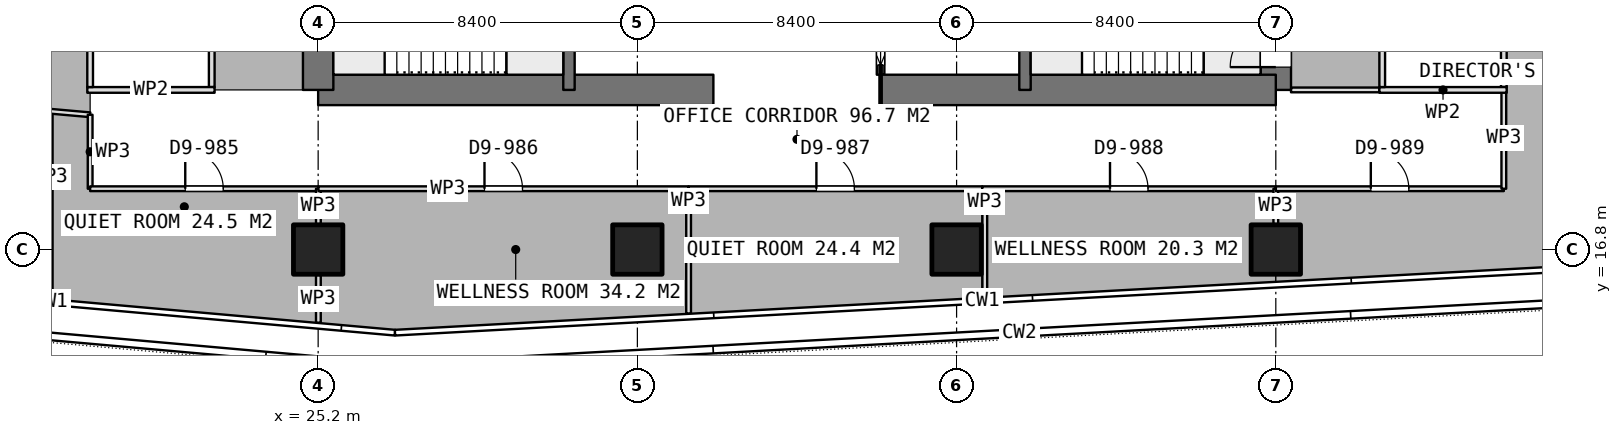
"""IFC4 building model, lengths in metres.
Left out: names, types, materials, properties, quantities, classifications, styles, units other than length and angle.
Written with IfcOpenShell. Run it as: python <this file> out.ifc"""

import sys

from ifc_helpers import new_model, si_unit, direction, frame, frame_2d, origin, origin_2d, place, context, subcontext, project, spatial, rectangle, extrude, element, fill, save


model = new_model("IFC4")
c1 = context("Model", 3, precision=1e-05, world=origin(), true_north=direction((0.0, 1.0)))
c2 = subcontext(c1, "Body", "Model", "MODEL_VIEW")
j1 = project(units=[si_unit("LENGTHUNIT", "METRE"), si_unit("PLANEANGLEUNIT", "RADIAN")], contexts=[c1])
p1 = place(None, origin())
s1 = spatial("IfcSite", under=j1, at=p1, CompositionType="ELEMENT")
p2 = place(p1, origin())
s2 = spatial("IfcBuilding", under=s1, at=p2, CompositionType="ELEMENT")
p3 = place(p2, frame((0.0, 0.0, 265.1)))
s3 = spatial("IfcBuildingStorey", under=s2, at=p3, CompositionType="ELEMENT", Elevation=265.1)
p4 = place(p3, frame((25.2, 21.0, 0.0), z_axis=(0.0, 0.0, 1.0), x_axis=(1.0, 0.0, 0.0)))
e1 = element("IfcWall", 1, at=p4, inside=s3, PredefinedType="SHEAR", context=c2, shape_type="SweptSolid", body=[
    extrude(rectangle(XDim=10.4, YDim=0.8, at=frame_2d((5.2, 0.0))), origin(), (0.0, 0.0, 1.0), 3.75),
])
p5 = place(p3, frame((40.0, 21.0, 0.0), z_axis=(0.0, 0.0, 1.0), x_axis=(1.0, 0.0, 0.0)))
e2 = element("IfcWall", 2, at=p5, inside=s3, PredefinedType="SHEAR", context=c2, shape_type="SweptSolid", body=[
    extrude(rectangle(XDim=10.4, YDim=0.8, at=frame_2d((5.2, 0.0))), origin(), (0.0, 0.0, 1.0), 3.75),
])
p6 = place(p3, frame((25.2, 21.0, 0.0), z_axis=(0.0, 0.0, 1.0), x_axis=(0.0, 1.0, 0.0)))
e3 = element("IfcWall", 3, at=p6, inside=s3, PredefinedType="SHEAR", context=c2, shape_type="SweptSolid", body=[
    extrude(rectangle(XDim=25.2, YDim=0.8, at=frame_2d((12.6, 0.0))), origin(), (0.0, 0.0, 1.0), 3.75),
])
p7 = place(p6, frame((7.8, 0.0, 0.0)))
e4 = element("IfcOpeningElement", 4, at=p7, cuts=e3, PredefinedType="OPENING", context=c2, shape_type="SweptSolid", body=[
    extrude(rectangle(XDim=1.2, YDim=2.1, at=frame_2d((0.6, 1.05))), frame((0.0, 0.41, 0.0), z_axis=(0.0, -1.0, 0.0), x_axis=(1.0, 0.0, 0.0)), (0.0, 0.0, 1.0), 0.82),
])
p8 = place(p6, frame((14.25, 0.0, 0.0)))
e5 = element("IfcOpeningElement", 5, at=p8, cuts=e3, PredefinedType="OPENING", context=c2, shape_type="SweptSolid", body=[
    extrude(rectangle(XDim=0.9, YDim=2.1, at=frame_2d((0.45, 1.05))), frame((0.0, 0.41, 0.0), z_axis=(0.0, -1.0, 0.0), x_axis=(1.0, 0.0, 0.0)), (0.0, 0.0, 1.0), 0.82),
])
p9 = place(p6, frame((16.85, 0.0, 0.0)))
e6 = element("IfcOpeningElement", 6, at=p9, cuts=e3, PredefinedType="OPENING", context=c2, shape_type="SweptSolid", body=[
    extrude(rectangle(XDim=0.9, YDim=2.1, at=frame_2d((0.45, 1.05))), frame((0.0, 0.41, 0.0), z_axis=(0.0, -1.0, 0.0), x_axis=(1.0, 0.0, 0.0)), (0.0, 0.0, 1.0), 0.82),
])
p10 = place(p6, frame((18.95, 0.0, 0.0)))
e7 = element("IfcOpeningElement", 7, at=p10, cuts=e3, PredefinedType="OPENING", context=c2, shape_type="SweptSolid", body=[
    extrude(rectangle(XDim=1.2, YDim=2.1, at=frame_2d((0.6, 1.05))), frame((0.0, 0.41, 0.0), z_axis=(0.0, -1.0, 0.0), x_axis=(1.0, 0.0, 0.0)), (0.0, 0.0, 1.0), 0.82),
])
p11 = place(p3, frame((50.4, 21.0, 0.0), z_axis=(0.0, 0.0, 1.0), x_axis=(0.0, 1.0, 0.0)))
e8 = element("IfcWall", 8, at=p11, inside=s3, PredefinedType="SHEAR", context=c2, shape_type="SweptSolid", body=[
    extrude(rectangle(XDim=25.2, YDim=0.8, at=frame_2d((12.6, 0.0))), origin(), (0.0, 0.0, 1.0), 3.75),
])
p12 = place(p11, frame((16.2, 0.0, 0.0)))
e9 = element("IfcOpeningElement", 9, at=p12, cuts=e8, PredefinedType="OPENING", context=c2, shape_type="SweptSolid", body=[
    extrude(rectangle(XDim=1.2, YDim=2.1, at=frame_2d((0.6, 1.05))), frame((0.0, 0.41, 0.0), z_axis=(0.0, -1.0, 0.0), x_axis=(1.0, 0.0, 0.0)), (0.0, 0.0, 1.0), 0.82),
])
p13 = place(p11, frame((10.05, 0.0, 0.0)))
e10 = element("IfcOpeningElement", 10, at=p13, cuts=e8, PredefinedType="OPENING", context=c2, shape_type="SweptSolid", body=[
    extrude(rectangle(XDim=0.9, YDim=2.1, at=frame_2d((0.45, 1.05))), frame((0.0, 0.41, 0.0), z_axis=(0.0, -1.0, 0.0), x_axis=(1.0, 0.0, 0.0)), (0.0, 0.0, 1.0), 0.82),
])
p14 = place(p11, frame((7.45, 0.0, 0.0)))
e11 = element("IfcOpeningElement", 11, at=p14, cuts=e8, PredefinedType="OPENING", context=c2, shape_type="SweptSolid", body=[
    extrude(rectangle(XDim=0.9, YDim=2.1, at=frame_2d((0.45, 1.05))), frame((0.0, 0.41, 0.0), z_axis=(0.0, -1.0, 0.0), x_axis=(1.0, 0.0, 0.0)), (0.0, 0.0, 1.0), 0.82),
])
p15 = place(p11, frame((0.6, 0.0, 0.0)))
e12 = element("IfcOpeningElement", 12, at=p15, cuts=e8, PredefinedType="OPENING", context=c2, shape_type="SweptSolid", body=[
    extrude(rectangle(XDim=1.2, YDim=2.1, at=frame_2d((0.6, 1.05))), frame((0.0, 0.41, 0.0), z_axis=(0.0, -1.0, 0.0), x_axis=(1.0, 0.0, 0.0)), (0.0, 0.0, 1.0), 0.82),
])
for number, where, z_axis, x_axis in (
    (13, (31.8, 21.0, 0.0), (0.0, 0.0, 1.0), (0.0, 1.0, 0.0)),
    (14, (43.8, 21.0, 0.0), (0.0, 0.0, 1.0), (0.0, 1.0, 0.0)),
):
    element("IfcWall", number, at=place(p3, frame(where, z_axis=z_axis, x_axis=x_axis)), inside=s3, PredefinedType="SHEAR", context=c2, shape_type="SweptSolid", body=[
        extrude(rectangle(XDim=25.2, YDim=0.3, at=frame_2d((12.6, 0.0))), origin(), (0.0, 0.0, 1.0), 3.75),
    ])
for number, where, z_axis, x_axis in (
    (15, (25.2, 16.8, 0.0), (0.0, 0.0, 1.0), (1.0, 0.0, 0.0)),
    (16, (33.6, 16.8, 0.0), (0.0, 0.0, 1.0), (1.0, 0.0, 0.0)),
    (17, (42.0, 16.8, 0.0), (0.0, 0.0, 1.0), (1.0, 0.0, 0.0)),
    (18, (50.4, 16.8, 0.0), (0.0, 0.0, 1.0), (1.0, 0.0, 0.0)),
):
    element("IfcColumn", number, at=place(p3, frame(where, z_axis=z_axis, x_axis=x_axis)), inside=s3, PredefinedType="COLUMN", context=c2, shape_type="SweptSolid", body=[
        extrude(rectangle(XDim=1.3, YDim=1.3, at=origin_2d()), origin(), (0.0, 0.0, 1.0), 3.75),
    ])
p16 = place(p3, frame((40.0, 21.4, 0.0), z_axis=(0.0, 0.0, 1.0), x_axis=(0.0, 1.0, 0.0)))
e19 = element("IfcWall", 19, at=p16, inside=s3, PredefinedType="PARTITIONING", context=c2, shape_type="SweptSolid", body=[
    extrude(rectangle(XDim=1.85, YDim=0.2, at=frame_2d((0.925, 0.0))), origin(), (0.0, 0.0, 1.0), 3.5),
])
p17 = place(p16, frame((0.25, 0.0, 0.0)))
e20 = element("IfcOpeningElement", 20, at=p17, cuts=e19, PredefinedType="OPENING", context=c2, shape_type="SweptSolid", body=[
    extrude(rectangle(XDim=1.1, YDim=2.1, at=frame_2d((0.55, 1.05))), frame((0.0, 0.11, 0.0), z_axis=(0.0, -1.0, 0.0), x_axis=(1.0, 0.0, 0.0)), (0.0, 0.0, 1.0), 0.22),
])
p18 = place(p3, frame((19.125, 21.0, 0.0), z_axis=(0.0, 0.0, 1.0), x_axis=(1.0, 0.0, 0.0)))
e21 = element("IfcWall", 21, at=p18, inside=s3, PredefinedType="PARTITIONING", context=c2, shape_type="SweptSolid", body=[
    extrude(rectangle(XDim=3.35, YDim=0.15, at=frame_2d((1.675, 0.0))), origin(), (0.0, 0.0, 1.0), 3.5),
])
p19 = place(p3, frame((19.2, 21.075, 0.0), z_axis=(0.0, 0.0, 1.0), x_axis=(0.0, 1.0, 0.0)))
e22 = element("IfcWall", 22, at=p19, inside=s3, PredefinedType="PARTITIONING", context=c2, shape_type="SweptSolid", body=[
    extrude(rectangle(XDim=6.85, YDim=0.15, at=frame_2d((3.425, 0.0))), origin(), (0.0, 0.0, 1.0), 3.5),
])
p20 = place(p3, frame((22.4, 21.075, 0.0), z_axis=(0.0, 0.0, 1.0), x_axis=(0.0, 1.0, 0.0)))
e23 = element("IfcWall", 23, at=p20, inside=s3, PredefinedType="PARTITIONING", context=c2, shape_type="SweptSolid", body=[
    extrude(rectangle(XDim=6.85, YDim=0.15, at=frame_2d((3.425, 0.0))), origin(), (0.0, 0.0, 1.0), 3.5),
])
p21 = place(p20, frame((2.925, 0.0, 0.0)))
e24 = element("IfcOpeningElement", 24, at=p21, cuts=e23, PredefinedType="OPENING", context=c2, shape_type="SweptSolid", body=[
    extrude(rectangle(XDim=1.0, YDim=2.1, at=frame_2d((0.5, 1.05))), frame((0.0, 0.085, 0.0), z_axis=(0.0, -1.0, 0.0), x_axis=(1.0, 0.0, 0.0)), (0.0, 0.0, 1.0), 0.17),
])
p22 = place(p3, frame((53.125, 21.0, 0.0), z_axis=(0.0, 0.0, 1.0), x_axis=(1.0, 0.0, 0.0)))
e25 = element("IfcWall", 25, at=p22, inside=s3, PredefinedType="PARTITIONING", context=c2, shape_type="SweptSolid", body=[
    extrude(rectangle(XDim=3.35, YDim=0.15, at=frame_2d((1.675, 0.0))), origin(), (0.0, 0.0, 1.0), 3.5),
])
p23 = place(p3, frame((53.2, 21.075, 0.0), z_axis=(0.0, 0.0, 1.0), x_axis=(0.0, 1.0, 0.0)))
e26 = element("IfcWall", 26, at=p23, inside=s3, PredefinedType="PARTITIONING", context=c2, shape_type="SweptSolid", body=[
    extrude(rectangle(XDim=6.85, YDim=0.15, at=frame_2d((3.425, 0.0))), origin(), (0.0, 0.0, 1.0), 3.5),
])
p24 = place(p23, frame((2.925, 0.0, 0.0)))
e27 = element("IfcOpeningElement", 27, at=p24, cuts=e26, PredefinedType="OPENING", context=c2, shape_type="SweptSolid", body=[
    extrude(rectangle(XDim=1.0, YDim=2.1, at=frame_2d((0.5, 1.05))), frame((0.0, 0.085, 0.0), z_axis=(0.0, -1.0, 0.0), x_axis=(1.0, 0.0, 0.0)), (0.0, 0.0, 1.0), 0.17),
])
p25 = place(p3, frame((56.4, 21.075, 0.0), z_axis=(0.0, 0.0, 1.0), x_axis=(0.0, 1.0, 0.0)))
e28 = element("IfcWall", 28, at=p25, inside=s3, PredefinedType="PARTITIONING", context=c2, shape_type="SweptSolid", body=[
    extrude(rectangle(XDim=6.85, YDim=0.15, at=frame_2d((3.425, 0.0))), origin(), (0.0, 0.0, 1.0), 3.5),
])
p26 = place(p3, frame((53.124, 21.0, 0.0), z_axis=(0.0, 0.0, 1.0), x_axis=(-1.0, 0.0, 0.0)))
e29 = element("IfcWall", 29, at=p26, inside=s3, PredefinedType="PARTITIONING", context=c2, shape_type="SweptSolid", body=[
    extrude(rectangle(XDim=2.324, YDim=0.125, at=frame_2d((1.162, 0.0))), origin(), (0.0, 0.0, 1.0), 3.5),
])
p27 = place(p3, frame((34.948, 15.114, 0.0), z_axis=(0.0, 0.0, 1.0), x_axis=(0.0, 1.0, 0.0)))
e30 = element("IfcWall", 30, at=p27, inside=s3, PredefinedType="PARTITIONING", context=c2, shape_type="SweptSolid", body=[
    extrude(rectangle(XDim=3.286, YDim=0.125, at=frame_2d((1.643, 0.0))), origin(), (0.0, 0.0, 1.0), 3.5),
])
p28 = place(p3, frame((34.948, 18.4, 0.0), z_axis=(0.0, 0.0, 1.0), x_axis=(1.0, 0.0, 0.0)))
e31 = element("IfcWall", 31, at=p28, inside=s3, PredefinedType="PARTITIONING", context=c2, shape_type="SweptSolid", body=[
    extrude(rectangle(XDim=7.725, YDim=0.125, at=frame_2d((3.863, 0.0))), origin(), (0.0, 0.0, 1.0), 3.5),
])
p29 = place(p28, frame((3.363, 0.0, 0.0)))
e32 = element("IfcOpeningElement", 32, at=p29, cuts=e31, PredefinedType="OPENING", context=c2, shape_type="SweptSolid", body=[
    extrude(rectangle(XDim=1.0, YDim=2.1, at=frame_2d((0.5, 1.05))), frame((0.0, 0.073, 0.0), z_axis=(0.0, -1.0, 0.0), x_axis=(1.0, 0.0, 0.0)), (0.0, 0.0, 1.0), 0.145),
])
p30 = place(p3, frame((42.742, 18.337, 0.0), z_axis=(0.0, 0.0, 1.0), x_axis=(0.0, -1.0, 0.0)))
e33 = element("IfcWall", 33, at=p30, inside=s3, PredefinedType="PARTITIONING", context=c2, shape_type="SweptSolid", body=[
    extrude(rectangle(XDim=2.799, YDim=0.125, at=frame_2d((1.399, 0.0))), origin(), (0.0, 0.0, 1.0), 3.5),
])
p31 = place(p3, frame((42.674, 18.4, 0.0), z_axis=(0.0, 0.0, 1.0), x_axis=(1.0, 0.0, 0.0)))
e34 = element("IfcWall", 34, at=p31, inside=s3, PredefinedType="PARTITIONING", context=c2, shape_type="SweptSolid", body=[
    extrude(rectangle(XDim=7.726, YDim=0.125, at=frame_2d((3.863, 0.0))), origin(), (0.0, 0.0, 1.0), 3.5),
])
p32 = place(p31, frame((3.363, 0.0, 0.0)))
e35 = element("IfcOpeningElement", 35, at=p32, cuts=e34, PredefinedType="OPENING", context=c2, shape_type="SweptSolid", body=[
    extrude(rectangle(XDim=1.0, YDim=2.1, at=frame_2d((0.5, 1.05))), frame((0.0, 0.073, 0.0), z_axis=(0.0, -1.0, 0.0), x_axis=(1.0, 0.0, 0.0)), (0.0, 0.0, 1.0), 0.145),
])
p33 = place(p3, frame((50.4, 18.4, 0.0), z_axis=(0.0, 0.0, 1.0), x_axis=(0.0, -1.0, 0.0)))
e36 = element("IfcWall", 36, at=p33, inside=s3, PredefinedType="PARTITIONING", context=c2, shape_type="SweptSolid", body=[
    extrude(rectangle(XDim=0.93, YDim=0.125, at=frame_2d((0.465, 0.0))), origin(), (0.0, 0.0, 1.0), 3.5),
])
p34 = place(p3, frame((50.401, 18.4, 0.0), z_axis=(0.0, 0.0, 1.0), x_axis=(1.0, 0.0, 0.0)))
e37 = element("IfcWall", 37, at=p34, inside=s3, PredefinedType="PARTITIONING", context=c2, shape_type="SweptSolid", body=[
    extrude(rectangle(XDim=5.999, YDim=0.125, at=frame_2d((3.0, 0.0))), origin(), (0.0, 0.0, 1.0), 3.5),
])
p35 = place(p34, frame((2.499, 0.0, 0.0)))
e38 = element("IfcOpeningElement", 38, at=p35, cuts=e37, PredefinedType="OPENING", context=c2, shape_type="SweptSolid", body=[
    extrude(rectangle(XDim=1.0, YDim=2.1, at=frame_2d((0.5, 1.05))), frame((0.0, 0.073, 0.0), z_axis=(0.0, -1.0, 0.0), x_axis=(1.0, 0.0, 0.0)), (0.0, 0.0, 1.0), 0.145),
])
p36 = place(p3, frame((56.4, 18.4, 0.0), z_axis=(0.0, 0.0, 1.0), x_axis=(0.0, 1.0, 0.0)))
e39 = element("IfcWall", 39, at=p36, inside=s3, PredefinedType="PARTITIONING", context=c2, shape_type="SweptSolid", body=[
    extrude(rectangle(XDim=2.675, YDim=0.125, at=frame_2d((1.337, 0.0))), origin(), (0.0, 0.0, 1.0), 3.5),
])
p37 = place(p3, frame((18.149, 20.439, 0.0), z_axis=(0.0, 0.0, 1.0), x_axis=(0.0, -1.0, 0.0)))
e40 = element("IfcWall", 40, at=p37, inside=s3, PredefinedType="PARTITIONING", context=c2, shape_type="SweptSolid", body=[
    extrude(rectangle(XDim=4.939, YDim=0.125, at=frame_2d((2.469, 0.0))), origin(), (0.0, 0.0, 1.0), 3.5),
])
p38 = place(p3, frame((18.15, 20.439, 0.0), z_axis=(0.0, 0.0, 1.0), x_axis=(0.996099374617, -0.088238517026, 0.0)))
e41 = element("IfcWall", 41, at=p38, inside=s3, PredefinedType="PARTITIONING", context=c2, shape_type="SweptSolid", body=[
    extrude(rectangle(XDim=1.054, YDim=0.125, at=frame_2d((0.527, 0.0))), origin(), (0.0, 0.0, 1.0), 3.5),
])
p39 = place(p3, frame((19.2, 20.346, 0.0), z_axis=(0.0, 0.0, 1.0), x_axis=(0.0, -1.0, 0.0)))
e42 = element("IfcWall", 42, at=p39, inside=s3, PredefinedType="PARTITIONING", context=c2, shape_type="SweptSolid", body=[
    extrude(rectangle(XDim=1.946, YDim=0.125, at=frame_2d((0.973, 0.0))), origin(), (0.0, 0.0, 1.0), 3.5),
])
p40 = place(p3, frame((19.2, 18.4, 0.0), z_axis=(0.0, 0.0, 1.0), x_axis=(1.0, 0.0, 0.0)))
e43 = element("IfcWall", 43, at=p40, inside=s3, PredefinedType="PARTITIONING", context=c2, shape_type="SweptSolid", body=[
    extrude(rectangle(XDim=6.006, YDim=0.125, at=frame_2d((3.003, 0.0))), origin(), (0.0, 0.0, 1.0), 3.5),
])
p41 = place(p40, frame((2.503, 0.0, 0.0)))
e44 = element("IfcOpeningElement", 44, at=p41, cuts=e43, PredefinedType="OPENING", context=c2, shape_type="SweptSolid", body=[
    extrude(rectangle(XDim=1.0, YDim=2.1, at=frame_2d((0.5, 1.05))), frame((0.0, 0.073, 0.0), z_axis=(0.0, -1.0, 0.0), x_axis=(1.0, 0.0, 0.0)), (0.0, 0.0, 1.0), 0.145),
])
p42 = place(p3, frame((25.206, 18.4, 0.0), z_axis=(0.0, 0.0, 1.0), x_axis=(0.0, -1.0, 0.0)))
e45 = element("IfcWall", 45, at=p42, inside=s3, PredefinedType="PARTITIONING", context=c2, shape_type="SweptSolid", body=[
    extrude(rectangle(XDim=0.93, YDim=0.125, at=frame_2d((0.465, 0.0))), origin(), (0.0, 0.0, 1.0), 3.5),
])
p43 = place(p3, frame((25.206, 16.13, 0.0), z_axis=(0.0, 0.0, 1.0), x_axis=(0.0, -1.0, 0.0)))
e46 = element("IfcWall", 46, at=p43, inside=s3, PredefinedType="PARTITIONING", context=c2, shape_type="SweptSolid", body=[
    extrude(rectangle(XDim=1.258, YDim=0.125, at=frame_2d((0.629, 0.0))), origin(), (0.0, 0.0, 1.0), 3.5),
])
p44 = place(p3, frame((25.207, 18.4, 0.0), z_axis=(0.0, 0.0, 1.0), x_axis=(1.0, 0.0, 0.0)))
e47 = element("IfcWall", 47, at=p44, inside=s3, PredefinedType="PARTITIONING", context=c2, shape_type="SweptSolid", body=[
    extrude(rectangle(XDim=9.74, YDim=0.125, at=frame_2d((4.87, 0.0))), origin(), (0.0, 0.0, 1.0), 3.5),
])
p45 = place(p44, frame((4.37, 0.0, 0.0)))
e48 = element("IfcOpeningElement", 48, at=p45, cuts=e47, PredefinedType="OPENING", context=c2, shape_type="SweptSolid", body=[
    extrude(rectangle(XDim=1.0, YDim=2.1, at=frame_2d((0.5, 1.05))), frame((0.0, 0.073, 0.0), z_axis=(0.0, -1.0, 0.0), x_axis=(1.0, 0.0, 0.0)), (0.0, 0.0, 1.0), 0.145),
])
p46 = place(p17, origin())
e49 = element("IfcDoor", 49, at=p46, inside=s3, OperationType="SLIDING_TO_LEFT", PredefinedType="DOOR", context=c2, shape_type="SweptSolid", body=[
    extrude(rectangle(XDim=1.1, YDim=2.1, at=frame_2d((0.55, 1.05))), frame((0.0, 0.025, 0.0), z_axis=(0.0, -1.0, 0.0), x_axis=(1.0, 0.0, 0.0)), (0.0, 0.0, 1.0), 0.05),
])
fill(e20, e49)
p47 = place(p29, origin())
e50 = element("IfcDoor", 50, at=p47, inside=s3, OperationType="SINGLE_SWING_LEFT", PredefinedType="DOOR", context=c2, shape_type="SweptSolid", body=[
    extrude(rectangle(XDim=1.0, YDim=2.1, at=frame_2d((0.5, 1.05))), frame((0.0, 0.025, 0.0), z_axis=(0.0, -1.0, 0.0), x_axis=(1.0, 0.0, 0.0)), (0.0, 0.0, 1.0), 0.05),
])
fill(e32, e50)
p48 = place(p32, origin())
e51 = element("IfcDoor", 51, at=p48, inside=s3, OperationType="SINGLE_SWING_LEFT", PredefinedType="DOOR", context=c2, shape_type="SweptSolid", body=[
    extrude(rectangle(XDim=1.0, YDim=2.1, at=frame_2d((0.5, 1.05))), frame((0.0, 0.025, 0.0), z_axis=(0.0, -1.0, 0.0), x_axis=(1.0, 0.0, 0.0)), (0.0, 0.0, 1.0), 0.05),
])
fill(e35, e51)
p49 = place(p35, origin())
e52 = element("IfcDoor", 52, at=p49, inside=s3, OperationType="SINGLE_SWING_LEFT", PredefinedType="DOOR", context=c2, shape_type="SweptSolid", body=[
    extrude(rectangle(XDim=1.0, YDim=2.1, at=frame_2d((0.5, 1.05))), frame((0.0, 0.025, 0.0), z_axis=(0.0, -1.0, 0.0), x_axis=(1.0, 0.0, 0.0)), (0.0, 0.0, 1.0), 0.05),
])
fill(e38, e52)
p50 = place(p41, origin())
e53 = element("IfcDoor", 53, at=p50, inside=s3, OperationType="SINGLE_SWING_LEFT", PredefinedType="DOOR", context=c2, shape_type="SweptSolid", body=[
    extrude(rectangle(XDim=1.0, YDim=2.1, at=frame_2d((0.5, 1.05))), frame((0.0, 0.025, 0.0), z_axis=(0.0, -1.0, 0.0), x_axis=(1.0, 0.0, 0.0)), (0.0, 0.0, 1.0), 0.05),
])
fill(e44, e53)
p51 = place(p45, origin())
e54 = element("IfcDoor", 54, at=p51, inside=s3, OperationType="SINGLE_SWING_LEFT", PredefinedType="DOOR", context=c2, shape_type="SweptSolid", body=[
    extrude(rectangle(XDim=1.0, YDim=2.1, at=frame_2d((0.5, 1.05))), frame((0.0, 0.025, 0.0), z_axis=(0.0, -1.0, 0.0), x_axis=(1.0, 0.0, 0.0)), (0.0, 0.0, 1.0), 0.05),
])
fill(e48, e54)
p52 = place(p15, origin())
e55 = element("IfcDoor", 55, at=p52, inside=s3, OperationType="SINGLE_SWING_RIGHT", PredefinedType="DOOR", context=c2, shape_type="SweptSolid", body=[
    extrude(rectangle(XDim=1.2, YDim=2.1, at=frame_2d((0.6, 1.05))), frame((0.0, 0.025, 0.0), z_axis=(0.0, -1.0, 0.0), x_axis=(1.0, 0.0, 0.0)), (0.0, 0.0, 1.0), 0.05),
])
fill(e12, e55)
save(model, sys.argv[1])
